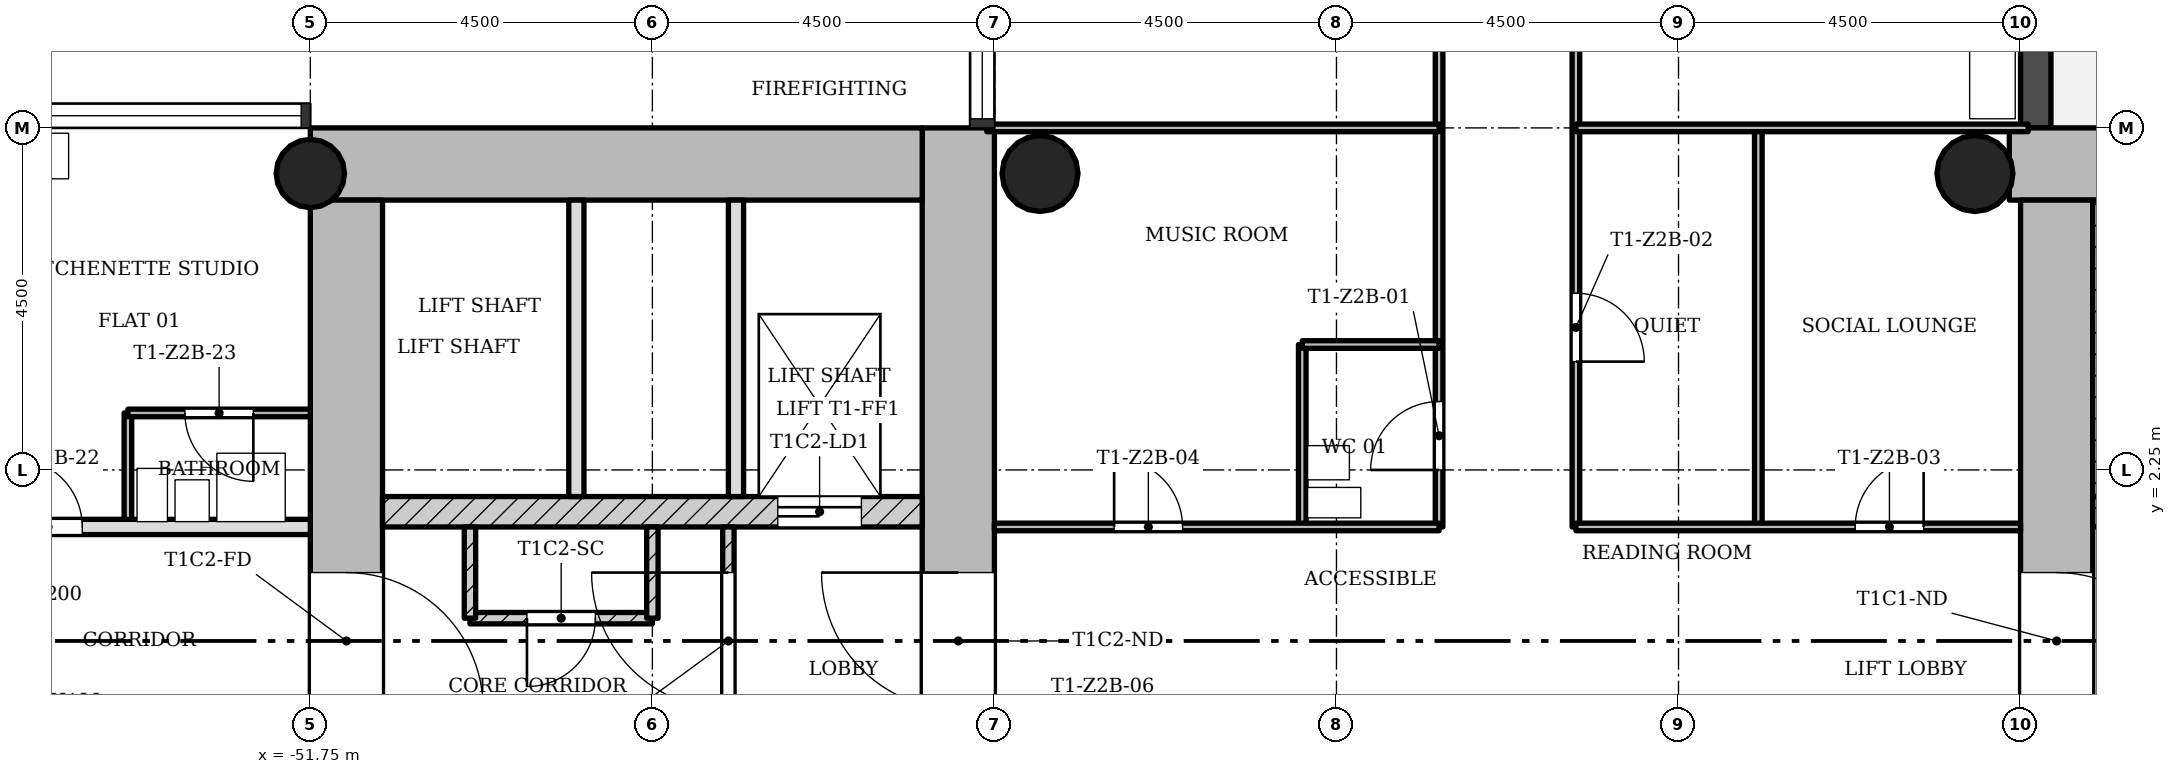
"""IFC4 building model, lengths in metres.
Left out: names, types, materials, properties, quantities, classifications, styles, units other than length and angle.
Written with IfcOpenShell. Run it as: python <this file> out.ifc"""

import sys

from ifc_helpers import new_model, si_unit, direction, frame, frame_2d, origin, origin_2d, place, context, subcontext, project, spatial, rectangle, hollow_circle, extrude, element, fill, save


model = new_model("IFC4")
c1 = context("Model", 3, precision=1e-05, world=origin(), true_north=direction((0.0, 1.0)))
c2 = subcontext(c1, "Body", "Model", "MODEL_VIEW")
j1 = project(units=[si_unit("LENGTHUNIT", "METRE"), si_unit("PLANEANGLEUNIT", "RADIAN")], contexts=[c1])
p1 = place(None, origin())
s1 = spatial("IfcSite", under=j1, at=p1, CompositionType="ELEMENT")
p2 = place(p1, origin())
s2 = spatial("IfcBuilding", under=s1, at=p2, CompositionType="ELEMENT")
p3 = place(p2, frame((0.0, 0.0, 83.4)))
s3 = spatial("IfcBuildingStorey", under=s2, at=p3, CompositionType="ELEMENT", Elevation=83.4)
p4 = place(p3, frame((-20.702, 6.275, 0.0), z_axis=(0.0, 0.0, 1.0), x_axis=(-1.0, 0.0, 0.0)))
e1 = element("IfcWall", 1, at=p4, inside=s3, PredefinedType="SHEAR", context=c2, shape_type="SweptSolid", body=[
    extrude(rectangle(XDim=8.696, YDim=0.95, at=frame_2d((4.348, 0.0))), origin(), (0.0, 0.0, 1.0), 3.4),
])
p5 = place(p3, frame((-28.775, 5.8, 0.0), z_axis=(0.0, 0.0, 1.0), x_axis=(0.0, -1.0, 0.0)))
e2 = element("IfcWall", 2, at=p5, inside=s3, PredefinedType="SHEAR", context=c2, shape_type="SweptSolid", body=[
    extrude(rectangle(XDim=12.55, YDim=0.95, at=frame_2d((6.275, 0.0))), origin(), (0.0, 0.0, 1.0), 3.4),
])
p6 = place(p5, frame((4.9, 0.0, 0.0)))
e3 = element("IfcOpeningElement", 3, at=p6, cuts=e2, PredefinedType="OPENING", context=c2, shape_type="SweptSolid", body=[
    extrude(rectangle(XDim=1.8, YDim=2.1, at=frame_2d((0.9, 1.05))), frame((0.0, 0.485, 0.0), z_axis=(0.0, -1.0, 0.0), x_axis=(1.0, 0.0, 0.0)), (0.0, 0.0, 1.0), 0.97),
])
p7 = place(p3, frame((-28.3, 1.7, 0.0), z_axis=(0.0, 0.0, 1.0), x_axis=(1.0, 0.0, 0.0)))
e4 = element("IfcWall", 4, at=p7, inside=s3, PredefinedType="SHEAR", context=c2, shape_type="SweptSolid", body=[
    extrude(rectangle(XDim=7.1, YDim=0.4, at=frame_2d((3.55, 0.0))), origin(), (0.0, 0.0, 1.0), 3.4),
])
p8 = place(p7, frame((0.7, 0.0, 0.0)))
e5 = element("IfcOpeningElement", 5, at=p8, cuts=e4, PredefinedType="OPENING", context=c2, shape_type="SweptSolid", body=[
    extrude(rectangle(XDim=0.9, YDim=2.1, at=frame_2d((0.45, 1.05))), frame((0.0, 0.21, 0.0), z_axis=(0.0, -1.0, 0.0), x_axis=(1.0, 0.0, 0.0)), (0.0, 0.0, 1.0), 0.42),
])
p9 = place(p3, frame((-43.225, -5.8, 0.0), z_axis=(0.0, 0.0, 1.0), x_axis=(0.0, 1.0, 0.0)))
e6 = element("IfcWall", 6, at=p9, inside=s3, PredefinedType="SHEAR", context=c2, shape_type="SweptSolid", body=[
    extrude(rectangle(XDim=12.55, YDim=0.95, at=frame_2d((6.275, 0.0))), origin(), (0.0, 0.0, 1.0), 3.4),
])
p10 = place(p9, frame((4.9, 0.0, 0.0)))
e7 = element("IfcOpeningElement", 7, at=p10, cuts=e6, PredefinedType="OPENING", context=c2, shape_type="SweptSolid", body=[
    extrude(rectangle(XDim=1.8, YDim=2.1, at=frame_2d((0.9, 1.05))), frame((0.0, 0.485, 0.0), z_axis=(0.0, -1.0, 0.0), x_axis=(1.0, 0.0, 0.0)), (0.0, 0.0, 1.0), 0.97),
])
p11 = place(p3, frame((-43.7, 6.275, 0.0), z_axis=(0.0, 0.0, 1.0), x_axis=(-1.0, 0.0, 0.0)))
e8 = element("IfcWall", 8, at=p11, inside=s3, PredefinedType="SHEAR", context=c2, shape_type="SweptSolid", body=[
    extrude(rectangle(XDim=8.05, YDim=0.95, at=frame_2d((4.025, 0.0))), origin(), (0.0, 0.0, 1.0), 3.4),
])
p12 = place(p3, frame((-51.275, 5.8, 0.0), z_axis=(0.0, 0.0, 1.0), x_axis=(0.0, -1.0, 0.0)))
e9 = element("IfcWall", 9, at=p12, inside=s3, PredefinedType="SHEAR", context=c2, shape_type="SweptSolid", body=[
    extrude(rectangle(XDim=12.55, YDim=0.95, at=frame_2d((6.275, 0.0))), origin(), (0.0, 0.0, 1.0), 3.4),
])
p13 = place(p12, frame((4.9, 0.0, 0.0)))
e10 = element("IfcOpeningElement", 10, at=p13, cuts=e9, PredefinedType="OPENING", context=c2, shape_type="SweptSolid", body=[
    extrude(rectangle(XDim=1.8, YDim=2.1, at=frame_2d((0.9, 1.05))), frame((0.0, 0.485, 0.0), z_axis=(0.0, -1.0, 0.0), x_axis=(1.0, 0.0, 0.0)), (0.0, 0.0, 1.0), 0.97),
])
p14 = place(p3, frame((-50.8, 1.7, 0.0), z_axis=(0.0, 0.0, 1.0), x_axis=(1.0, 0.0, 0.0)))
e11 = element("IfcWall", 11, at=p14, inside=s3, PredefinedType="SHEAR", context=c2, shape_type="SweptSolid", body=[
    extrude(rectangle(XDim=7.1, YDim=0.4, at=frame_2d((3.55, 0.0))), origin(), (0.0, 0.0, 1.0), 3.4),
])
p15 = place(p14, frame((5.2, 0.0, 0.0)))
e12 = element("IfcOpeningElement", 12, at=p15, cuts=e11, PredefinedType="OPENING", context=c2, shape_type="SweptSolid", body=[
    extrude(rectangle(XDim=1.1, YDim=2.1, at=frame_2d((0.55, 1.05))), frame((0.0, 0.21, 0.0), z_axis=(0.0, -1.0, 0.0), x_axis=(1.0, 0.0, 0.0)), (0.0, 0.0, 1.0), 0.42),
])
p16 = place(p3, frame((-51.75, 6.15, 0.0), z_axis=(0.0, 0.0, 1.0), x_axis=(1.0, 0.0, 0.0)))
e13 = element("IfcColumn", 13, at=p16, inside=s3, PredefinedType="COLUMN", context=c2, shape_type="SweptSolid", body=[
    extrude(hollow_circle(Radius=0.45, WallThickness=0.032, at=origin_2d()), origin(), (0.0, 0.0, 1.0), 3.4),
])
for number, where, z_axis, x_axis in (
    (14, (-29.85, 6.15, 0.0), (0.0, 0.0, 1.0), (1.0, 0.0, 0.0)),
    (15, (-42.15, 6.15, 0.0), (0.0, 0.0, 1.0), (1.0, 0.0, 0.0)),
):
    element("IfcColumn", number, at=place(p3, frame(where, z_axis=z_axis, x_axis=x_axis)), inside=s3, PredefinedType="COLUMN", context=c2, shape_type="SweptSolid", body=[
        extrude(hollow_circle(Radius=0.5, WallThickness=0.036, at=origin_2d()), origin(), (0.0, 0.0, 1.0), 3.4),
    ])
p17 = place(p3, frame((-29.05, 6.75, -0.02), z_axis=(0.0, 0.0, 1.0), x_axis=(0.0, 1.0, 0.0)))
e16 = element("IfcWall", 16, at=p17, inside=s3, PredefinedType="STANDARD", context=c2, shape_type="SweptSolid", body=[
    extrude(rectangle(XDim=4.5, YDim=0.4, at=frame_2d((2.25, 0.0))), origin(), (0.0, 0.0, 1.0), 3.12),
])
p18 = place(p17, frame((1.35, 0.0, 0.02)))
e17 = element("IfcOpeningElement", 17, at=p18, cuts=e16, PredefinedType="OPENING", context=c2, shape_type="SweptSolid", body=[
    extrude(rectangle(XDim=1.8, YDim=2.1, at=frame_2d((0.9, 1.05))), frame((0.0, 0.21, 0.0), z_axis=(0.0, -1.0, 0.0), x_axis=(1.0, 0.0, 0.0)), (0.0, 0.0, 1.0), 0.42),
])
p19 = place(p3, frame((-46.25, 1.5, 0.0), z_axis=(0.0, 0.0, 1.0), x_axis=(0.0, -1.0, 0.0)))
e18 = element("IfcWall", 18, at=p19, inside=s3, PredefinedType="PARTITIONING", context=c2, shape_type="SweptSolid", body=[
    extrude(rectangle(XDim=3.0, YDim=0.15, at=frame_2d((1.5, 0.0))), origin(), (0.0, 0.0, 1.0), 3.0),
])
p20 = place(p19, frame((0.6, 0.0, 0.0)))
e19 = element("IfcOpeningElement", 19, at=p20, cuts=e18, PredefinedType="OPENING", context=c2, shape_type="SweptSolid", body=[
    extrude(rectangle(XDim=1.8, YDim=2.1, at=frame_2d((0.9, 1.05))), frame((0.0, 0.085, 0.0), z_axis=(0.0, -1.0, 0.0), x_axis=(1.0, 0.0, 0.0)), (0.0, 0.0, 1.0), 0.17),
])
for number, where, z_axis, x_axis in (
    (20, (-46.15, 5.8, 0.0), (0.0, 0.0, 1.0), (0.0, -1.0, 0.0)),
    (21, (-48.25, 5.8, 0.0), (0.0, 0.0, 1.0), (0.0, -1.0, 0.0)),
):
    element("IfcWall", number, at=place(p3, frame(where, z_axis=z_axis, x_axis=x_axis)), inside=s3, PredefinedType="SOLIDWALL", context=c2, shape_type="SweptSolid", body=[
        extrude(rectangle(XDim=3.9, YDim=0.2, at=frame_2d((1.95, 0.0))), origin(), (0.0, 0.0, 1.0), 3.0),
    ])
p21 = place(p3, frame((-47.25, 0.3, 0.0), z_axis=(0.0, 0.0, 1.0), x_axis=(-1.0, 0.0, 0.0)))
e22 = element("IfcWall", 22, at=p21, inside=s3, PredefinedType="PARTITIONING", context=c2, shape_type="SweptSolid", body=[
    extrude(rectangle(XDim=2.4, YDim=0.15, at=frame_2d((1.2, 0.0))), origin(), (0.0, 0.0, 1.0), 3.0),
])
p22 = place(p21, frame((0.75, 0.0, 0.0)))
e23 = element("IfcOpeningElement", 23, at=p22, cuts=e22, PredefinedType="OPENING", context=c2, shape_type="SweptSolid", body=[
    extrude(rectangle(XDim=0.9, YDim=2.1, at=frame_2d((0.45, 1.05))), frame((0.0, 0.085, 0.0), z_axis=(0.0, -1.0, 0.0), x_axis=(1.0, 0.0, 0.0)), (0.0, 0.0, 1.0), 0.17),
])
for number, where, z_axis, x_axis in (
    (24, (-47.25, 0.3, 0.0), (0.0, 0.0, 1.0), (0.0, 1.0, 0.0)),
    (25, (-49.65, 0.3, 0.0), (0.0, 0.0, 1.0), (0.0, 1.0, 0.0)),
):
    element("IfcWall", number, at=place(p3, frame(where, z_axis=z_axis, x_axis=x_axis)), inside=s3, PredefinedType="PARTITIONING", context=c2, shape_type="SweptSolid", body=[
        extrude(rectangle(XDim=1.2, YDim=0.15, at=frame_2d((0.6, 0.0))), origin(), (0.0, 0.0, 1.0), 3.0),
    ])
p23 = place(p3, frame((-54.15, 1.5, 0.0), z_axis=(0.0, 0.0, 1.0), x_axis=(0.0, 1.0, 0.0)))
e26 = element("IfcWall", 26, at=p23, inside=s3, PredefinedType="PARTITIONING", context=c2, shape_type="SweptSolid", body=[
    extrude(rectangle(XDim=1.5, YDim=0.1, at=frame_2d((0.75, 0.0))), origin(), (0.0, 0.0, 1.0), 3.0),
])
p24 = place(p3, frame((-38.7, 1.5, 0.0), z_axis=(0.0, 0.0, 1.0), x_axis=(0.0, 1.0, 0.0)))
e27 = element("IfcWall", 27, at=p24, inside=s3, PredefinedType="PARTITIONING", context=c2, shape_type="SweptSolid", body=[
    extrude(rectangle(XDim=2.4, YDim=0.1, at=frame_2d((1.2, 0.0))), origin(), (0.0, 0.0, 1.0), 3.0),
])
p25 = place(p3, frame((-36.9, 1.5, 0.0), z_axis=(0.0, 0.0, 1.0), x_axis=(0.0, 1.0, 0.0)))
e28 = element("IfcWall", 28, at=p25, inside=s3, PredefinedType="PARTITIONING", context=c2, shape_type="SweptSolid", body=[
    extrude(rectangle(XDim=9.75, YDim=0.1, at=frame_2d((4.875, 0.0))), origin(), (0.0, 0.0, 1.0), 3.0),
])
p26 = place(p25, frame((0.75, 0.0, 0.0)))
e29 = element("IfcOpeningElement", 29, at=p26, cuts=e28, PredefinedType="OPENING", context=c2, shape_type="SweptSolid", body=[
    extrude(rectangle(XDim=0.9, YDim=2.1, at=frame_2d((0.45, 1.05))), frame((0.0, 0.06, 0.0), z_axis=(0.0, -1.0, 0.0), x_axis=(1.0, 0.0, 0.0)), (0.0, 0.0, 1.0), 0.12),
])
p27 = place(p25, frame((7.05, 0.0, 0.0)))
e30 = element("IfcOpeningElement", 30, at=p27, cuts=e28, PredefinedType="OPENING", context=c2, shape_type="SweptSolid", body=[
    extrude(rectangle(XDim=0.9, YDim=2.1, at=frame_2d((0.45, 1.05))), frame((0.0, 0.06, 0.0), z_axis=(0.0, -1.0, 0.0), x_axis=(1.0, 0.0, 0.0)), (0.0, 0.0, 1.0), 0.12),
])
p28 = place(p3, frame((-35.1, 1.5, 0.0), z_axis=(0.0, 0.0, 1.0), x_axis=(0.0, 1.0, 0.0)))
e31 = element("IfcWall", 31, at=p28, inside=s3, PredefinedType="PARTITIONING", context=c2, shape_type="SweptSolid", body=[
    extrude(rectangle(XDim=9.75, YDim=0.1, at=frame_2d((4.875, 0.0))), origin(), (0.0, 0.0, 1.0), 3.0),
])
p29 = place(p28, frame((2.175, 0.0, 0.0)))
e32 = element("IfcOpeningElement", 32, at=p29, cuts=e31, PredefinedType="OPENING", context=c2, shape_type="SweptSolid", body=[
    extrude(rectangle(XDim=0.9, YDim=2.1, at=frame_2d((0.45, 1.05))), frame((0.0, 0.06, 0.0), z_axis=(0.0, -1.0, 0.0), x_axis=(1.0, 0.0, 0.0)), (0.0, 0.0, 1.0), 0.12),
])
p30 = place(p28, frame((7.05, 0.0, 0.0)))
e33 = element("IfcOpeningElement", 33, at=p30, cuts=e31, PredefinedType="OPENING", context=c2, shape_type="SweptSolid", body=[
    extrude(rectangle(XDim=0.9, YDim=2.1, at=frame_2d((0.45, 1.05))), frame((0.0, 0.06, 0.0), z_axis=(0.0, -1.0, 0.0), x_axis=(1.0, 0.0, 0.0)), (0.0, 0.0, 1.0), 0.12),
])
p31 = place(p3, frame((-32.7, 1.5, 0.0), z_axis=(0.0, 0.0, 1.0), x_axis=(0.0, 1.0, 0.0)))
e34 = element("IfcWall", 34, at=p31, inside=s3, PredefinedType="PARTITIONING", context=c2, shape_type="SweptSolid", body=[
    extrude(rectangle(XDim=5.25, YDim=0.1, at=frame_2d((2.625, 0.0))), origin(), (0.0, 0.0, 1.0), 3.0),
])
p32 = place(p3, frame((-42.75, 1.5, 0.0), z_axis=(0.0, 0.0, 1.0), x_axis=(1.0, 0.0, 0.0)))
e35 = element("IfcWall", 35, at=p32, inside=s3, PredefinedType="PARTITIONING", context=c2, shape_type="SweptSolid", body=[
    extrude(rectangle(XDim=5.85, YDim=0.1, at=frame_2d((2.925, 0.0))), origin(), (0.0, 0.0, 1.0), 3.0),
])
p33 = place(p32, frame((1.575, 0.0, 0.0)))
e36 = element("IfcOpeningElement", 36, at=p33, cuts=e35, PredefinedType="OPENING", context=c2, shape_type="SweptSolid", body=[
    extrude(rectangle(XDim=0.9, YDim=2.1, at=frame_2d((0.45, 1.05))), frame((0.0, 0.06, 0.0), z_axis=(0.0, -1.0, 0.0), x_axis=(1.0, 0.0, 0.0)), (0.0, 0.0, 1.0), 0.12),
])
p34 = place(p3, frame((-35.1, 1.5, 0.0), z_axis=(0.0, 0.0, 1.0), x_axis=(1.0, 0.0, 0.0)))
e37 = element("IfcWall", 37, at=p34, inside=s3, PredefinedType="PARTITIONING", context=c2, shape_type="SweptSolid", body=[
    extrude(rectangle(XDim=5.85, YDim=0.1, at=frame_2d((2.925, 0.0))), origin(), (0.0, 0.0, 1.0), 3.0),
])
p35 = place(p34, frame((3.675, 0.0, 0.0)))
e38 = element("IfcOpeningElement", 38, at=p35, cuts=e37, PredefinedType="OPENING", context=c2, shape_type="SweptSolid", body=[
    extrude(rectangle(XDim=0.9, YDim=2.1, at=frame_2d((0.45, 1.05))), frame((0.0, 0.06, 0.0), z_axis=(0.0, -1.0, 0.0), x_axis=(1.0, 0.0, 0.0)), (0.0, 0.0, 1.0), 0.12),
])
p36 = place(p3, frame((-56.25, 1.5, 0.0), z_axis=(0.0, 0.0, 1.0), x_axis=(1.0, 0.0, 0.0)))
e39 = element("IfcWall", 39, at=p36, inside=s3, PredefinedType="SOLIDWALL", context=c2, shape_type="SweptSolid", body=[
    extrude(rectangle(XDim=4.5, YDim=0.2, at=frame_2d((2.25, 0.0))), origin(), (0.0, 0.0, 1.0), 3.0),
])
p37 = place(p36, frame((0.6, 0.0, 0.0)))
e40 = element("IfcOpeningElement", 40, at=p37, cuts=e39, PredefinedType="OPENING", context=c2, shape_type="SweptSolid", body=[
    extrude(rectangle(XDim=0.9, YDim=2.1, at=frame_2d((0.45, 1.05))), frame((0.0, 0.11, 0.0), z_axis=(0.0, -1.0, 0.0), x_axis=(1.0, 0.0, 0.0)), (0.0, 0.0, 1.0), 0.22),
])
p38 = place(p3, frame((-54.15, 3.0, 0.0), z_axis=(0.0, 0.0, 1.0), x_axis=(1.0, 0.0, 0.0)))
e41 = element("IfcWall", 41, at=p38, inside=s3, PredefinedType="PARTITIONING", context=c2, shape_type="SweptSolid", body=[
    extrude(rectangle(XDim=2.4, YDim=0.1, at=frame_2d((1.2, 0.0))), origin(), (0.0, 0.0, 1.0), 3.0),
])
p39 = place(p38, frame((0.75, 0.0, 0.0)))
e42 = element("IfcOpeningElement", 42, at=p39, cuts=e41, PredefinedType="OPENING", context=c2, shape_type="SweptSolid", body=[
    extrude(rectangle(XDim=0.9, YDim=2.1, at=frame_2d((0.45, 1.05))), frame((0.0, 0.06, 0.0), z_axis=(0.0, -1.0, 0.0), x_axis=(1.0, 0.0, 0.0)), (0.0, 0.0, 1.0), 0.12),
])
p40 = place(p3, frame((-38.7, 3.9, 0.0), z_axis=(0.0, 0.0, 1.0), x_axis=(1.0, 0.0, 0.0)))
e43 = element("IfcWall", 43, at=p40, inside=s3, PredefinedType="PARTITIONING", context=c2, shape_type="SweptSolid", body=[
    extrude(rectangle(XDim=1.8, YDim=0.1, at=frame_2d((0.9, 0.0))), origin(), (0.0, 0.0, 1.0), 3.0),
])
for number, where, z_axis, x_axis in (
    (44, (-42.85, 6.75, 0.0), (0.0, 0.0, 1.0), (1.0, 0.0, 0.0)),
    (45, (-35.1, 6.75, 0.0), (0.0, 0.0, 1.0), (1.0, 0.0, 0.0)),
):
    element("IfcWall", number, at=place(p3, frame(where, z_axis=z_axis, x_axis=x_axis)), inside=s3, PredefinedType="PARTITIONING", context=c2, shape_type="SweptSolid", body=[
        extrude(rectangle(XDim=5.95, YDim=0.1, at=frame_2d((2.975, 0.0))), origin(), (0.0, 0.0, 1.0), 3.0),
    ])
p41 = place(p3, frame((-28.175, 1.9, 0.0), z_axis=(0.0, 0.0, 1.0), x_axis=(0.0, 1.0, 0.0)))
e46 = element("IfcWall", 46, at=p41, inside=s3, PredefinedType="SHEAR", context=c2, shape_type="SweptSolid", body=[
    extrude(rectangle(XDim=3.9, YDim=0.25, at=frame_2d((1.95, 0.0))), origin(), (0.0, 0.0, 1.0), 3.4),
])
p42 = place(p20, origin())
e47 = element("IfcDoor", 47, at=p42, inside=s3, OperationType="SINGLE_SWING_LEFT", PredefinedType="DOOR", context=c2, shape_type="SweptSolid", body=[
    extrude(rectangle(XDim=1.8, YDim=2.1, at=frame_2d((0.9, 1.05))), frame((0.0, 0.025, 0.0), z_axis=(0.0, -1.0, 0.0), x_axis=(1.0, 0.0, 0.0)), (0.0, 0.0, 1.0), 0.05),
])
fill(e19, e47)
p43 = place(p22, origin())
e48 = element("IfcDoor", 48, at=p43, inside=s3, OperationType="SINGLE_SWING_LEFT", PredefinedType="DOOR", context=c2, shape_type="SweptSolid", body=[
    extrude(rectangle(XDim=0.9, YDim=2.1, at=frame_2d((0.45, 1.05))), frame((0.0, 0.025, 0.0), z_axis=(0.0, -1.0, 0.0), x_axis=(1.0, 0.0, 0.0)), (0.0, 0.0, 1.0), 0.05),
])
fill(e23, e48)
p44 = place(p26, origin())
e49 = element("IfcDoor", 49, at=p44, inside=s3, OperationType="SINGLE_SWING_RIGHT", PredefinedType="DOOR", context=c2, shape_type="SweptSolid", body=[
    extrude(rectangle(XDim=0.9, YDim=2.1, at=frame_2d((0.45, 1.05))), frame((0.0, 0.025, 0.0), z_axis=(0.0, -1.0, 0.0), x_axis=(1.0, 0.0, 0.0)), (0.0, 0.0, 1.0), 0.05),
])
fill(e29, e49)
p45 = place(p29, origin())
e50 = element("IfcDoor", 50, at=p45, inside=s3, OperationType="SINGLE_SWING_LEFT", PredefinedType="DOOR", context=c2, shape_type="SweptSolid", body=[
    extrude(rectangle(XDim=0.9, YDim=2.1, at=frame_2d((0.45, 1.05))), frame((0.0, 0.025, 0.0), z_axis=(0.0, -1.0, 0.0), x_axis=(1.0, 0.0, 0.0)), (0.0, 0.0, 1.0), 0.05),
])
fill(e32, e50)
p46 = place(p35, origin())
e51 = element("IfcDoor", 51, at=p46, inside=s3, OperationType="SINGLE_SWING_LEFT", PredefinedType="DOOR", context=c2, shape_type="SweptSolid", body=[
    extrude(rectangle(XDim=0.9, YDim=2.1, at=frame_2d((0.45, 1.05))), frame((0.0, 0.025, 0.0), z_axis=(0.0, -1.0, 0.0), x_axis=(1.0, 0.0, 0.0)), (0.0, 0.0, 1.0), 0.05),
])
fill(e38, e51)
p47 = place(p33, origin())
e52 = element("IfcDoor", 52, at=p47, inside=s3, OperationType="SINGLE_SWING_RIGHT", PredefinedType="DOOR", context=c2, shape_type="SweptSolid", body=[
    extrude(rectangle(XDim=0.9, YDim=2.1, at=frame_2d((0.45, 1.05))), frame((0.0, 0.025, 0.0), z_axis=(0.0, -1.0, 0.0), x_axis=(1.0, 0.0, 0.0)), (0.0, 0.0, 1.0), 0.05),
])
fill(e36, e52)
p48 = place(p37, origin())
e53 = element("IfcDoor", 53, at=p48, inside=s3, OperationType="SINGLE_SWING_RIGHT", PredefinedType="DOOR", context=c2, shape_type="SweptSolid", body=[
    extrude(rectangle(XDim=0.9, YDim=2.1, at=frame_2d((0.45, 1.05))), frame((0.0, 0.025, 0.0), z_axis=(0.0, -1.0, 0.0), x_axis=(1.0, 0.0, 0.0)), (0.0, 0.0, 1.0), 0.05),
])
fill(e40, e53)
p49 = place(p39, origin())
e54 = element("IfcDoor", 54, at=p49, inside=s3, OperationType="SINGLE_SWING_RIGHT", PredefinedType="DOOR", context=c2, shape_type="SweptSolid", body=[
    extrude(rectangle(XDim=0.9, YDim=2.1, at=frame_2d((0.45, 1.05))), frame((0.0, 0.025, 0.0), z_axis=(0.0, -1.0, 0.0), x_axis=(1.0, 0.0, 0.0)), (0.0, 0.0, 1.0), 0.05),
])
fill(e42, e54)
p50 = place(p6, origin())
e55 = element("IfcDoor", 55, at=p50, inside=s3, OperationType="SINGLE_SWING_LEFT", PredefinedType="DOOR", context=c2, shape_type="SweptSolid", body=[
    extrude(rectangle(XDim=1.8, YDim=2.1, at=frame_2d((0.9, 1.05))), frame((0.0, 0.025, 0.0), z_axis=(0.0, -1.0, 0.0), x_axis=(1.0, 0.0, 0.0)), (0.0, 0.0, 1.0), 0.05),
])
fill(e3, e55)
p51 = place(p15, origin())
e56 = element("IfcDoor", 56, at=p51, inside=s3, OperationType="SLIDING_TO_LEFT", PredefinedType="DOOR", context=c2, shape_type="SweptSolid", body=[
    extrude(rectangle(XDim=1.1, YDim=2.1, at=frame_2d((0.55, 1.05))), frame((0.0, 0.025, 0.0), z_axis=(0.0, -1.0, 0.0), x_axis=(1.0, 0.0, 0.0)), (0.0, 0.0, 1.0), 0.05),
])
fill(e12, e56)
p52 = place(p10, origin())
e57 = element("IfcDoor", 57, at=p52, inside=s3, OperationType="SINGLE_SWING_LEFT", PredefinedType="DOOR", context=c2, shape_type="SweptSolid", body=[
    extrude(rectangle(XDim=1.8, YDim=2.1, at=frame_2d((0.9, 1.05))), frame((0.0, 0.025, 0.0), z_axis=(0.0, -1.0, 0.0), x_axis=(1.0, 0.0, 0.0)), (0.0, 0.0, 1.0), 0.05),
])
fill(e7, e57)
p53 = place(p13, origin())
e58 = element("IfcDoor", 58, at=p53, inside=s3, OperationType="SINGLE_SWING_LEFT", PredefinedType="DOOR", context=c2, shape_type="SweptSolid", body=[
    extrude(rectangle(XDim=1.8, YDim=2.1, at=frame_2d((0.9, 1.05))), frame((0.0, 0.025, 0.0), z_axis=(0.0, -1.0, 0.0), x_axis=(1.0, 0.0, 0.0)), (0.0, 0.0, 1.0), 0.05),
])
fill(e10, e58)
save(model, sys.argv[1])
